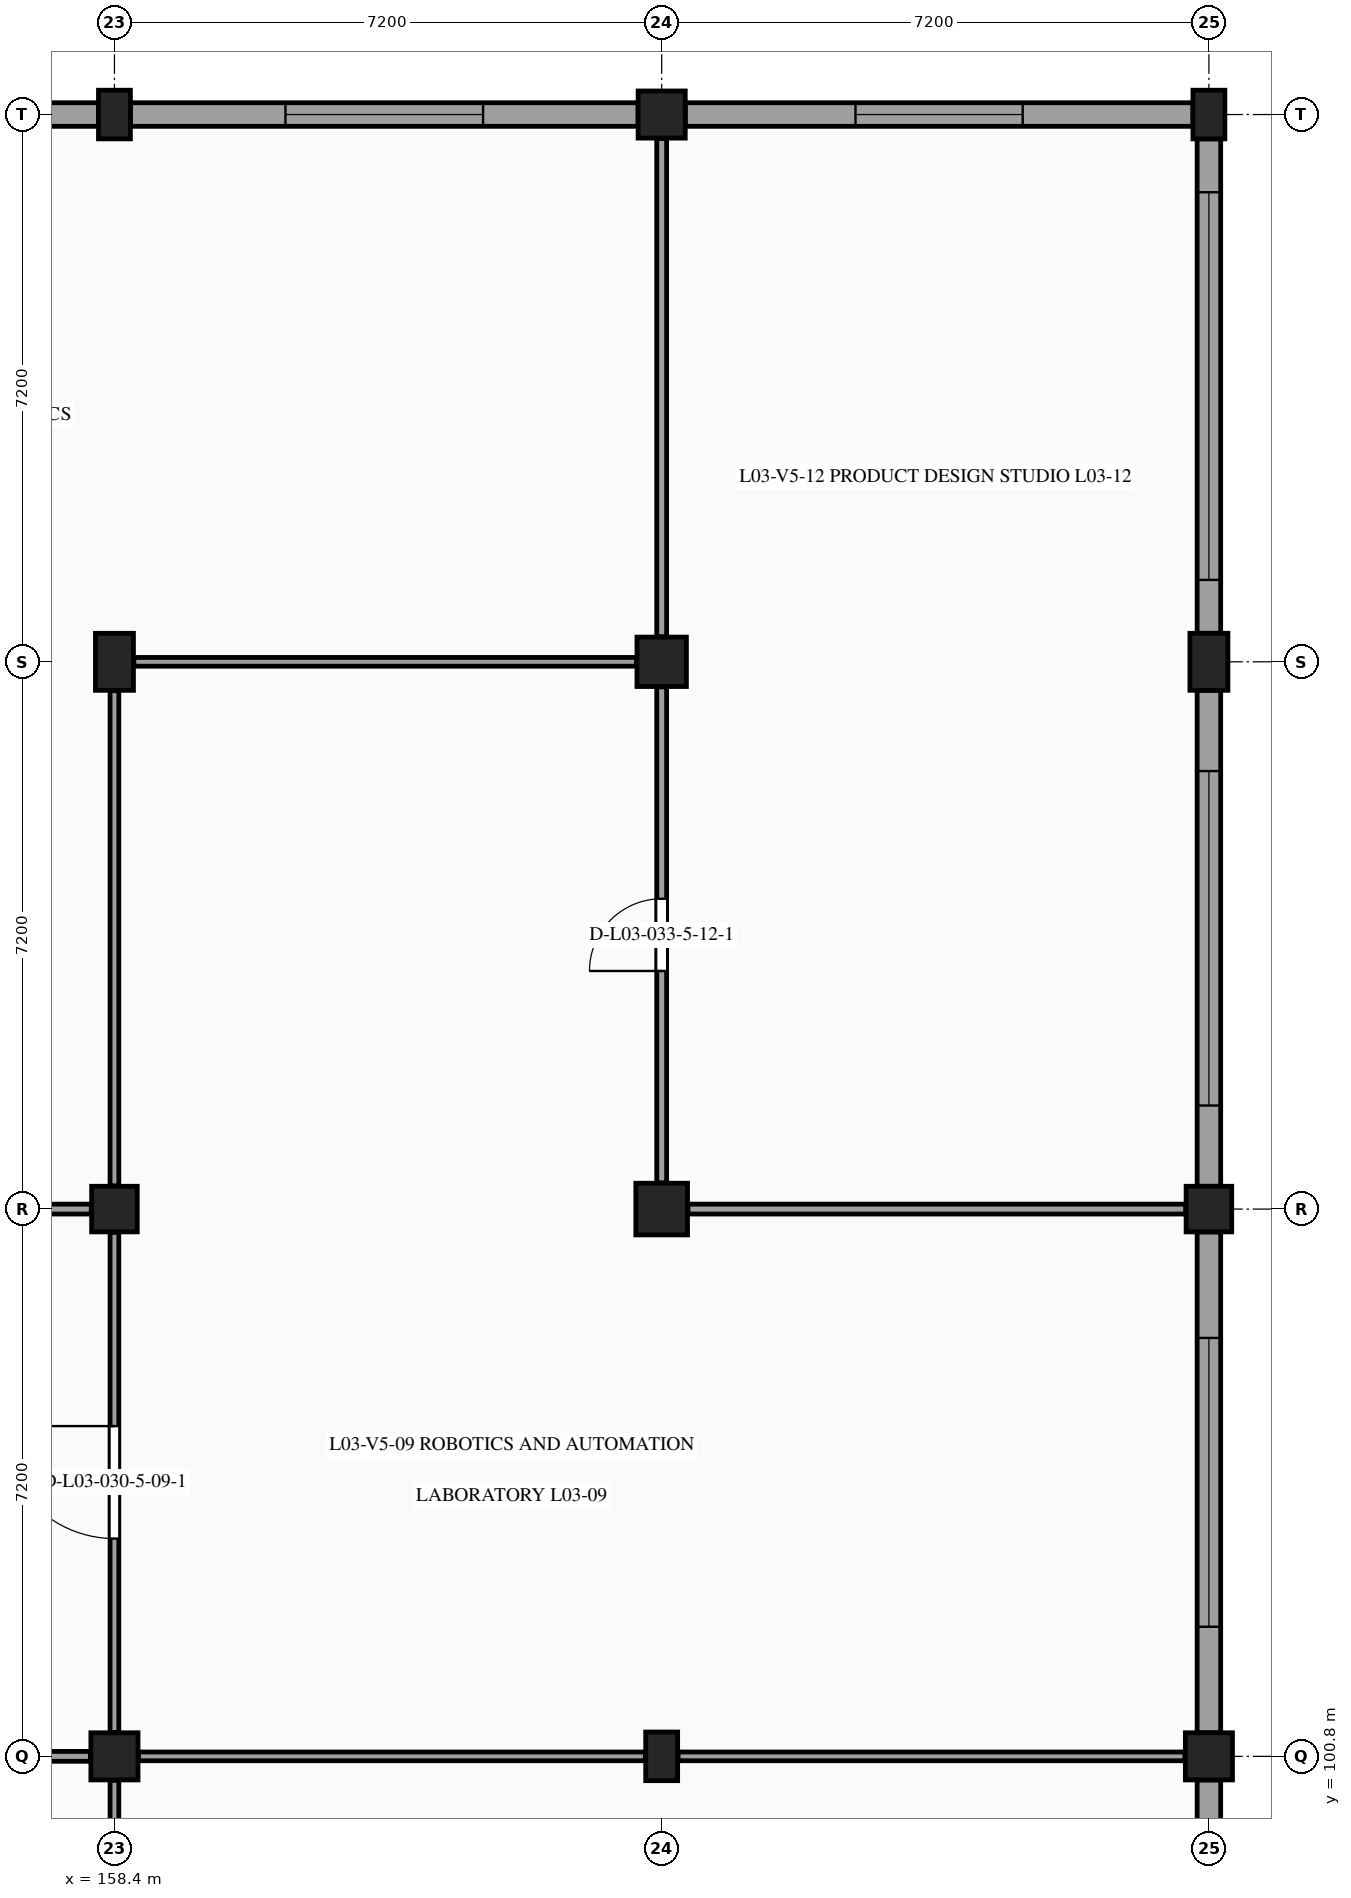
"""IFC4 building model, lengths in metres.
Left out: names, types, materials, properties, quantities, classifications, styles, units other than length and angle.
Written with IfcOpenShell. Run it as: python <this file> out.ifc"""

import sys

from ifc_helpers import new_model, si_unit, direction, frame, frame_2d, origin, origin_2d, place, context, subcontext, project, spatial, rectangle, extrude, element, fill, save


model = new_model("IFC4")
c1 = context("Model", 3, precision=1e-05, world=origin(), true_north=direction((0.0, 1.0)))
c2 = subcontext(c1, "Body", "Model", "MODEL_VIEW")
j1 = project(units=[si_unit("LENGTHUNIT", "METRE"), si_unit("PLANEANGLEUNIT", "RADIAN")], contexts=[c1])
p1 = place(None, origin())
s1 = spatial("IfcSite", under=j1, at=p1, CompositionType="ELEMENT")
p2 = place(p1, origin())
s2 = spatial("IfcBuilding", under=s1, at=p2, CompositionType="ELEMENT")
p3 = place(p2, frame((0.0, 0.0, 14.4)))
s3 = spatial("IfcBuildingStorey", under=s2, at=p3, CompositionType="ELEMENT", Elevation=14.4)
p4 = place(p3, frame((158.4, 100.8, 0.0), z_axis=(0.0, 0.0, 1.0), x_axis=(1.0, 0.0, 0.0)))
e1 = element("IfcColumn", 1, at=p4, inside=s3, PredefinedType="COLUMN", context=c2, shape_type="SweptSolid", body=[
    extrude(rectangle(XDim=0.62, YDim=0.62, at=origin_2d()), origin(), (0.0, 0.0, 1.0), 4.2),
])
p5 = place(p3, frame((158.4, 108.0, 0.0), z_axis=(0.0, 0.0, 1.0), x_axis=(1.0, 0.0, 0.0)))
e2 = element("IfcColumn", 2, at=p5, inside=s3, PredefinedType="COLUMN", context=c2, shape_type="SweptSolid", body=[
    extrude(rectangle(XDim=0.6, YDim=0.6, at=origin_2d()), origin(), (0.0, 0.0, 1.0), 4.2),
])
p6 = place(p3, frame((158.4, 115.2, 0.0), z_axis=(0.0, 0.0, 1.0), x_axis=(1.0, 0.0, 0.0)))
e3 = element("IfcColumn", 3, at=p6, inside=s3, PredefinedType="COLUMN", context=c2, shape_type="SweptSolid", body=[
    extrude(rectangle(XDim=0.5, YDim=0.75, at=origin_2d()), origin(), (0.0, 0.0, 1.0), 4.2),
])
for number, where, z_axis, x_axis in (
    (4, (158.4, 122.4, 0.0), (0.0, 0.0, 1.0), (1.0, 0.0, 0.0)),
    (5, (165.6, 100.8, 0.0), (0.0, 0.0, 1.0), (1.0, 0.0, 0.0)),
):
    element("IfcColumn", number, at=place(p3, frame(where, z_axis=z_axis, x_axis=x_axis)), inside=s3, PredefinedType="PILASTER", context=c2, shape_type="SweptSolid", body=[
        extrude(rectangle(XDim=0.42, YDim=0.64, at=origin_2d()), origin(), (0.0, 0.0, 1.0), 4.2),
    ])
p7 = place(p3, frame((165.6, 108.0, 0.0), z_axis=(0.0, 0.0, 1.0), x_axis=(1.0, 0.0, 0.0)))
e6 = element("IfcColumn", 6, at=p7, inside=s3, PredefinedType="COLUMN", context=c2, shape_type="SweptSolid", body=[
    extrude(rectangle(XDim=0.68, YDim=0.68, at=origin_2d()), origin(), (0.0, 0.0, 1.0), 4.2),
])
p8 = place(p3, frame((165.6, 115.2, 0.0), z_axis=(0.0, 0.0, 1.0), x_axis=(1.0, 0.0, 0.0)))
e7 = element("IfcColumn", 7, at=p8, inside=s3, PredefinedType="COLUMN", context=c2, shape_type="SweptSolid", body=[
    extrude(rectangle(XDim=0.65, YDim=0.65, at=origin_2d()), origin(), (0.0, 0.0, 1.0), 4.2),
])
for number, where, z_axis, x_axis in (
    (8, (165.6, 122.4, 0.0), (0.0, 0.0, 1.0), (1.0, 0.0, 0.0)),
    (9, (172.8, 100.8, 0.0), (0.0, 0.0, 1.0), (1.0, 0.0, 0.0)),
):
    element("IfcColumn", number, at=place(p3, frame(where, z_axis=z_axis, x_axis=x_axis)), inside=s3, PredefinedType="COLUMN", context=c2, shape_type="SweptSolid", body=[
        extrude(rectangle(XDim=0.62, YDim=0.62, at=origin_2d()), origin(), (0.0, 0.0, 1.0), 4.2),
    ])
p9 = place(p3, frame((172.8, 108.0, 0.0), z_axis=(0.0, 0.0, 1.0), x_axis=(1.0, 0.0, 0.0)))
e10 = element("IfcColumn", 10, at=p9, inside=s3, PredefinedType="COLUMN", context=c2, shape_type="SweptSolid", body=[
    extrude(rectangle(XDim=0.6, YDim=0.6, at=origin_2d()), origin(), (0.0, 0.0, 1.0), 4.2),
])
p10 = place(p3, frame((172.8, 115.2, 0.0), z_axis=(0.0, 0.0, 1.0), x_axis=(1.0, 0.0, 0.0)))
e11 = element("IfcColumn", 11, at=p10, inside=s3, PredefinedType="COLUMN", context=c2, shape_type="SweptSolid", body=[
    extrude(rectangle(XDim=0.5, YDim=0.75, at=origin_2d()), origin(), (0.0, 0.0, 1.0), 4.2),
])
p11 = place(p3, frame((172.8, 122.4, 0.0), z_axis=(0.0, 0.0, 1.0), x_axis=(1.0, 0.0, 0.0)))
e12 = element("IfcColumn", 12, at=p11, inside=s3, PredefinedType="PILASTER", context=c2, shape_type="SweptSolid", body=[
    extrude(rectangle(XDim=0.42, YDim=0.64, at=origin_2d()), origin(), (0.0, 0.0, 1.0), 4.2),
])
p12 = place(p3, frame((151.51, 122.4, 0.0), z_axis=(0.0, 0.0, 1.0), x_axis=(1.0, 0.0, 0.0)))
e13 = element("IfcWall", 13, at=p12, inside=s3, PredefinedType="STANDARD", context=c2, shape_type="SweptSolid", body=[
    extrude(rectangle(XDim=6.68, YDim=0.31, at=frame_2d((3.34, 0.0))), origin(), (0.0, 0.0, 1.0), 3.185),
])
p13 = place(p12, frame((1.84, 0.0, 0.98)))
e14 = element("IfcOpeningElement", 14, at=p13, cuts=e13, PredefinedType="OPENING", context=c2, shape_type="SweptSolid", body=[
    extrude(rectangle(XDim=3.0, YDim=1.5, at=frame_2d((1.5, 0.75))), frame((0.0, 0.165, 0.0), z_axis=(0.0, -1.0, 0.0), x_axis=(1.0, 0.0, 0.0)), (0.0, 0.0, 1.0), 0.33),
])
p14 = place(p3, frame((158.61, 122.4, 0.0), z_axis=(0.0, 0.0, 1.0), x_axis=(1.0, 0.0, 0.0)))
e15 = element("IfcWall", 15, at=p14, inside=s3, PredefinedType="STANDARD", context=c2, shape_type="SweptSolid", body=[
    extrude(rectangle(XDim=6.68, YDim=0.31, at=frame_2d((3.34, 0.0))), origin(), (0.0, 0.0, 1.0), 3.185),
])
p15 = place(p14, frame((2.04, 0.0, 0.98)))
e16 = element("IfcOpeningElement", 16, at=p15, cuts=e15, PredefinedType="OPENING", context=c2, shape_type="SweptSolid", body=[
    extrude(rectangle(XDim=2.6, YDim=1.5, at=frame_2d((1.3, 0.75))), frame((0.0, 0.165, 0.0), z_axis=(0.0, -1.0, 0.0), x_axis=(1.0, 0.0, 0.0)), (0.0, 0.0, 1.0), 0.33),
])
p16 = place(p3, frame((165.91, 122.4, 0.0), z_axis=(0.0, 0.0, 1.0), x_axis=(1.0, 0.0, 0.0)))
e17 = element("IfcWall", 17, at=p16, inside=s3, PredefinedType="STANDARD", context=c2, shape_type="SweptSolid", body=[
    extrude(rectangle(XDim=6.68, YDim=0.31, at=frame_2d((3.34, 0.0))), origin(), (0.0, 0.0, 1.0), 3.185),
])
p17 = place(p16, frame((2.24, 0.0, 0.98)))
e18 = element("IfcOpeningElement", 18, at=p17, cuts=e17, PredefinedType="OPENING", context=c2, shape_type="SweptSolid", body=[
    extrude(rectangle(XDim=2.2, YDim=1.45, at=frame_2d((1.1, 0.725))), frame((0.0, 0.165, 0.0), z_axis=(0.0, -1.0, 0.0), x_axis=(1.0, 0.0, 0.0)), (0.0, 0.0, 1.0), 0.33),
])
p18 = place(p3, frame((172.8, 122.08, 0.0), z_axis=(0.0, 0.0, 1.0), x_axis=(0.0, -1.0, 0.0)))
e19 = element("IfcWall", 19, at=p18, inside=s3, PredefinedType="STANDARD", context=c2, shape_type="SweptSolid", body=[
    extrude(rectangle(XDim=6.505, YDim=0.31, at=frame_2d((3.252, 0.0))), origin(), (0.0, 0.0, 1.0), 3.135),
])
p19 = place(p18, frame((0.702, 0.0, 0.98)))
e20 = element("IfcOpeningElement", 20, at=p19, cuts=e19, PredefinedType="OPENING", context=c2, shape_type="SweptSolid", body=[
    extrude(rectangle(XDim=5.1, YDim=1.75, at=frame_2d((2.55, 0.875))), frame((0.0, 0.165, 0.0), z_axis=(0.0, -1.0, 0.0), x_axis=(1.0, 0.0, 0.0)), (0.0, 0.0, 1.0), 0.33),
])
p20 = place(p3, frame((172.8, 114.825, 0.0), z_axis=(0.0, 0.0, 1.0), x_axis=(0.0, -1.0, 0.0)))
e21 = element("IfcWall", 21, at=p20, inside=s3, PredefinedType="STANDARD", context=c2, shape_type="SweptSolid", body=[
    extrude(rectangle(XDim=6.525, YDim=0.31, at=frame_2d((3.262, 0.0))), origin(), (0.0, 0.0, 1.0), 3.135),
])
p21 = place(p20, frame((1.062, 0.0, 0.98)))
e22 = element("IfcOpeningElement", 22, at=p21, cuts=e21, PredefinedType="OPENING", context=c2, shape_type="SweptSolid", body=[
    extrude(rectangle(XDim=4.4, YDim=1.65, at=frame_2d((2.2, 0.825))), frame((0.0, 0.165, 0.0), z_axis=(0.0, -1.0, 0.0), x_axis=(1.0, 0.0, 0.0)), (0.0, 0.0, 1.0), 0.33),
])
p22 = place(p3, frame((172.8, 107.7, 0.0), z_axis=(0.0, 0.0, 1.0), x_axis=(0.0, -1.0, 0.0)))
e23 = element("IfcWall", 23, at=p22, inside=s3, PredefinedType="STANDARD", context=c2, shape_type="SweptSolid", body=[
    extrude(rectangle(XDim=6.59, YDim=0.31, at=frame_2d((3.295, 0.0))), origin(), (0.0, 0.0, 1.0), 3.135),
])
p23 = place(p22, frame((1.395, 0.0, 0.98)))
e24 = element("IfcOpeningElement", 24, at=p23, cuts=e23, PredefinedType="OPENING", context=c2, shape_type="SweptSolid", body=[
    extrude(rectangle(XDim=3.8, YDim=1.6, at=frame_2d((1.9, 0.8))), frame((0.0, 0.165, 0.0), z_axis=(0.0, -1.0, 0.0), x_axis=(1.0, 0.0, 0.0)), (0.0, 0.0, 1.0), 0.33),
])
p24 = place(p3, frame((172.8, 100.49, 0.0), z_axis=(0.0, 0.0, 1.0), x_axis=(0.0, -1.0, 0.0)))
e25 = element("IfcWall", 25, at=p24, inside=s3, PredefinedType="STANDARD", context=c2, shape_type="SweptSolid", body=[
    extrude(rectangle(XDim=6.565, YDim=0.31, at=frame_2d((3.282, 0.0))), origin(), (0.0, 0.0, 1.0), 3.135),
])
p25 = place(p24, frame((1.833, 0.0, 0.98)))
e26 = element("IfcOpeningElement", 26, at=p25, cuts=e25, PredefinedType="OPENING", context=c2, shape_type="SweptSolid", body=[
    extrude(rectangle(XDim=2.9, YDim=1.6, at=frame_2d((1.45, 0.8))), frame((0.0, 0.165, 0.0), z_axis=(0.0, -1.0, 0.0), x_axis=(1.0, 0.0, 0.0)), (0.0, 0.0, 1.0), 0.33),
])
p26 = place(p3, frame((158.4, 93.93, 0.0), z_axis=(0.0, 0.0, 1.0), x_axis=(0.0, 1.0, 0.0)))
e27 = element("IfcWall", 27, at=p26, inside=s3, PredefinedType="PARTITIONING", context=c2, shape_type="SweptSolid", body=[
    extrude(rectangle(XDim=6.555, YDim=0.115, at=frame_2d((3.278, 0.0))), origin(), (0.0, 0.0, 1.0), 3.255),
])
p27 = place(p26, frame((2.498, 0.0, 0.0)))
e28 = element("IfcOpeningElement", 28, at=p27, cuts=e27, PredefinedType="OPENING", context=c2, shape_type="SweptSolid", body=[
    extrude(rectangle(XDim=1.56, YDim=2.25, at=frame_2d((0.78, 1.125))), frame((0.0, 0.067, 0.0), z_axis=(0.0, -1.0, 0.0), x_axis=(1.0, 0.0, 0.0)), (0.0, 0.0, 1.0), 0.135),
])
p28 = place(p3, frame((151.415, 100.8, 0.0), z_axis=(0.0, 0.0, 1.0), x_axis=(1.0, 0.0, 0.0)))
e29 = element("IfcWall", 29, at=p28, inside=s3, PredefinedType="PARTITIONING", context=c2, shape_type="SweptSolid", body=[
    extrude(rectangle(XDim=6.67, YDim=0.13, at=frame_2d((3.335, 0.0))), origin(), (0.0, 0.0, 1.0), 3.22),
])
p29 = place(p3, frame((158.4, 101.115, 0.0), z_axis=(0.0, 0.0, 1.0), x_axis=(0.0, 1.0, 0.0)))
e30 = element("IfcWall", 30, at=p29, inside=s3, PredefinedType="PARTITIONING", context=c2, shape_type="SweptSolid", body=[
    extrude(rectangle(XDim=6.58, YDim=0.115, at=frame_2d((3.29, 0.0))), origin(), (0.0, 0.0, 1.0), 3.25),
])
p30 = place(p29, frame((2.55, 0.0, 0.0)))
e31 = element("IfcOpeningElement", 31, at=p30, cuts=e30, PredefinedType="OPENING", context=c2, shape_type="SweptSolid", body=[
    extrude(rectangle(XDim=1.48, YDim=2.28, at=frame_2d((0.74, 1.14))), frame((0.0, 0.067, 0.0), z_axis=(0.0, -1.0, 0.0), x_axis=(1.0, 0.0, 0.0)), (0.0, 0.0, 1.0), 0.135),
])
p31 = place(p3, frame((151.545, 108.0, 0.0), z_axis=(0.0, 0.0, 1.0), x_axis=(1.0, 0.0, 0.0)))
e32 = element("IfcWall", 32, at=p31, inside=s3, PredefinedType="PARTITIONING", context=c2, shape_type="SweptSolid", body=[
    extrude(rectangle(XDim=6.55, YDim=0.13, at=frame_2d((3.275, 0.0))), origin(), (0.0, 0.0, 1.0), 3.22),
])
p32 = place(p3, frame((158.4, 108.305, 0.0), z_axis=(0.0, 0.0, 1.0), x_axis=(0.0, 1.0, 0.0)))
e33 = element("IfcWall", 33, at=p32, inside=s3, PredefinedType="PARTITIONING", context=c2, shape_type="SweptSolid", body=[
    extrude(rectangle(XDim=6.515, YDim=0.115, at=frame_2d((3.258, 0.0))), origin(), (0.0, 0.0, 1.0), 3.245),
])
p33 = place(p3, frame((158.715, 100.8, 0.0), z_axis=(0.0, 0.0, 1.0), x_axis=(1.0, 0.0, 0.0)))
e34 = element("IfcWall", 34, at=p33, inside=s3, PredefinedType="PARTITIONING", context=c2, shape_type="SweptSolid", body=[
    extrude(rectangle(XDim=6.67, YDim=0.115, at=frame_2d((3.335, 0.0))), origin(), (0.0, 0.0, 1.0), 3.24),
])
p34 = place(p3, frame((165.6, 108.345, 0.0), z_axis=(0.0, 0.0, 1.0), x_axis=(0.0, 1.0, 0.0)))
e35 = element("IfcWall", 35, at=p34, inside=s3, PredefinedType="PARTITIONING", context=c2, shape_type="SweptSolid", body=[
    extrude(rectangle(XDim=6.525, YDim=0.13, at=frame_2d((3.263, 0.0))), origin(), (0.0, 0.0, 1.0), 3.245),
])
p35 = place(p34, frame((2.788, 0.0, 0.0)))
e36 = element("IfcOpeningElement", 36, at=p35, cuts=e35, PredefinedType="OPENING", context=c2, shape_type="SweptSolid", body=[
    extrude(rectangle(XDim=0.95, YDim=2.15, at=frame_2d((0.475, 1.075))), frame((0.0, 0.075, 0.0), z_axis=(0.0, -1.0, 0.0), x_axis=(1.0, 0.0, 0.0)), (0.0, 0.0, 1.0), 0.15),
])
p36 = place(p3, frame((158.655, 115.2, 0.0), z_axis=(0.0, 0.0, 1.0), x_axis=(1.0, 0.0, 0.0)))
e37 = element("IfcWall", 37, at=p36, inside=s3, PredefinedType="PARTITIONING", context=c2, shape_type="SweptSolid", body=[
    extrude(rectangle(XDim=6.615, YDim=0.115, at=frame_2d((3.308, 0.0))), origin(), (0.0, 0.0, 1.0), 3.24),
])
p37 = place(p3, frame((165.6, 115.53, 0.0), z_axis=(0.0, 0.0, 1.0), x_axis=(0.0, 1.0, 0.0)))
e38 = element("IfcWall", 38, at=p37, inside=s3, PredefinedType="PARTITIONING", context=c2, shape_type="SweptSolid", body=[
    extrude(rectangle(XDim=6.555, YDim=0.13, at=frame_2d((3.277, 0.0))), origin(), (0.0, 0.0, 1.0), 3.245),
])
p38 = place(p3, frame((165.815, 100.8, 0.0), z_axis=(0.0, 0.0, 1.0), x_axis=(1.0, 0.0, 0.0)))
e39 = element("IfcWall", 39, at=p38, inside=s3, PredefinedType="PARTITIONING", context=c2, shape_type="SweptSolid", body=[
    extrude(rectangle(XDim=6.67, YDim=0.115, at=frame_2d((3.335, 0.0))), origin(), (0.0, 0.0, 1.0), 3.28),
])
p39 = place(p3, frame((165.945, 108.0, 0.0), z_axis=(0.0, 0.0, 1.0), x_axis=(1.0, 0.0, 0.0)))
e40 = element("IfcWall", 40, at=p39, inside=s3, PredefinedType="PARTITIONING", context=c2, shape_type="SweptSolid", body=[
    extrude(rectangle(XDim=6.55, YDim=0.13, at=frame_2d((3.275, 0.0))), origin(), (0.0, 0.0, 1.0), 3.28),
])
p40 = place(p15, origin())
e41 = element("IfcWindow", 41, at=p40, inside=s3, PartitioningType="SINGLE_PANEL", PredefinedType="WINDOW", context=c2, shape_type="SweptSolid", body=[
    extrude(rectangle(XDim=2.6, YDim=1.5, at=frame_2d((1.3, 0.75))), frame((0.0, -0.03, 0.0), z_axis=(0.0, -1.0, 0.0), x_axis=(1.0, 0.0, 0.0)), (0.0, 0.0, 1.0), 0.06),
])
fill(e16, e41)
p41 = place(p17, origin())
e42 = element("IfcWindow", 42, at=p41, inside=s3, PartitioningType="SINGLE_PANEL", PredefinedType="WINDOW", context=c2, shape_type="SweptSolid", body=[
    extrude(rectangle(XDim=2.2, YDim=1.45, at=frame_2d((1.1, 0.725))), frame((0.0, -0.03, 0.0), z_axis=(0.0, -1.0, 0.0), x_axis=(1.0, 0.0, 0.0)), (0.0, 0.0, 1.0), 0.06),
])
fill(e18, e42)
p42 = place(p19, origin())
e43 = element("IfcWindow", 43, at=p42, inside=s3, PartitioningType="SINGLE_PANEL", PredefinedType="WINDOW", context=c2, shape_type="SweptSolid", body=[
    extrude(rectangle(XDim=5.1, YDim=1.75, at=frame_2d((2.55, 0.875))), frame((0.0, -0.03, 0.0), z_axis=(0.0, -1.0, 0.0), x_axis=(1.0, 0.0, 0.0)), (0.0, 0.0, 1.0), 0.06),
])
fill(e20, e43)
p43 = place(p21, origin())
e44 = element("IfcWindow", 44, at=p43, inside=s3, PartitioningType="SINGLE_PANEL", PredefinedType="WINDOW", context=c2, shape_type="SweptSolid", body=[
    extrude(rectangle(XDim=4.4, YDim=1.65, at=frame_2d((2.2, 0.825))), frame((0.0, -0.03, 0.0), z_axis=(0.0, -1.0, 0.0), x_axis=(1.0, 0.0, 0.0)), (0.0, 0.0, 1.0), 0.06),
])
fill(e22, e44)
p44 = place(p23, origin())
e45 = element("IfcWindow", 45, at=p44, inside=s3, PartitioningType="SINGLE_PANEL", PredefinedType="WINDOW", context=c2, shape_type="SweptSolid", body=[
    extrude(rectangle(XDim=3.8, YDim=1.6, at=frame_2d((1.9, 0.8))), frame((0.0, -0.03, 0.0), z_axis=(0.0, -1.0, 0.0), x_axis=(1.0, 0.0, 0.0)), (0.0, 0.0, 1.0), 0.06),
])
fill(e24, e45)
p45 = place(p30, origin())
e46 = element("IfcDoor", 46, at=p45, inside=s3, OperationType="SINGLE_SWING_RIGHT", PredefinedType="DOOR", context=c2, shape_type="SweptSolid", body=[
    extrude(rectangle(XDim=1.48, YDim=2.28, at=frame_2d((0.74, 1.14))), frame((0.0, 0.025, 0.0), z_axis=(0.0, -1.0, 0.0), x_axis=(1.0, 0.0, 0.0)), (0.0, 0.0, 1.0), 0.05),
])
fill(e31, e46)
p46 = place(p35, origin())
e47 = element("IfcDoor", 47, at=p46, inside=s3, OperationType="SINGLE_SWING_LEFT", PredefinedType="DOOR", context=c2, shape_type="SweptSolid", body=[
    extrude(rectangle(XDim=0.95, YDim=2.15, at=frame_2d((0.475, 1.075))), frame((0.0, 0.025, 0.0), z_axis=(0.0, -1.0, 0.0), x_axis=(1.0, 0.0, 0.0)), (0.0, 0.0, 1.0), 0.05),
])
fill(e36, e47)
save(model, sys.argv[1])
